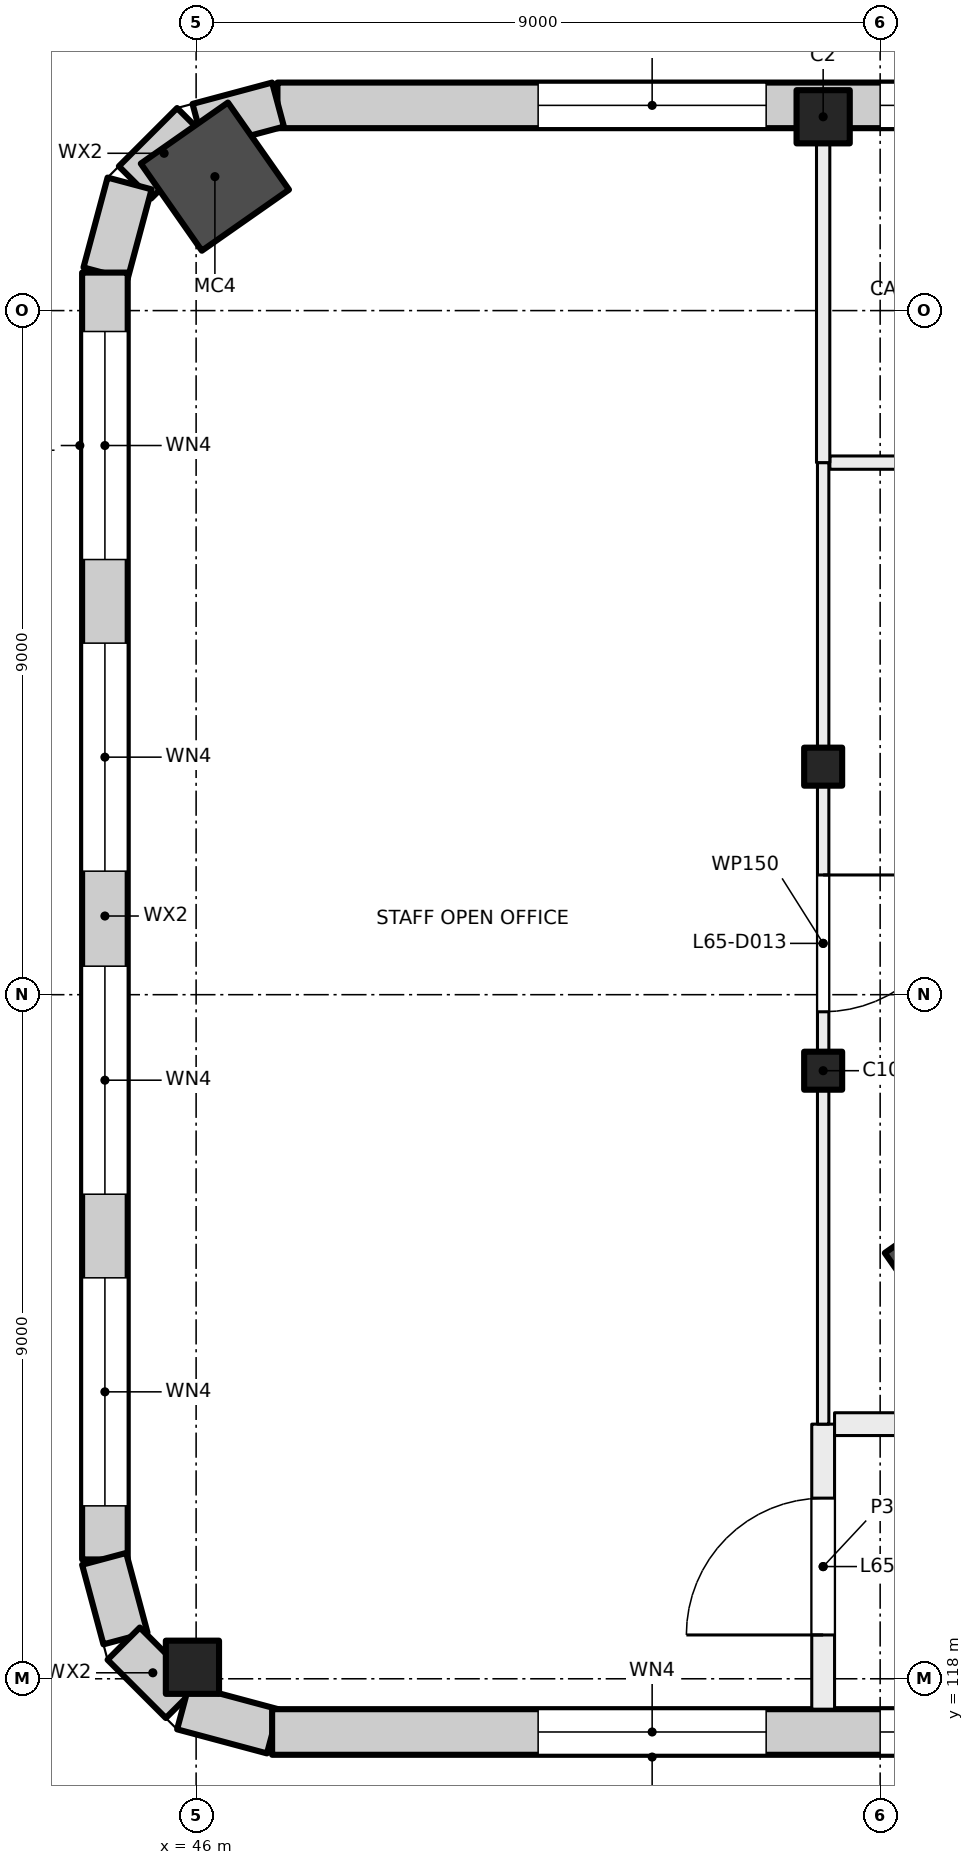
"""IFC4 building model, lengths in metres.
Left out: names, types, materials, properties, quantities, classifications, styles, units other than length and angle.
Written with IfcOpenShell. Run it as: python <this file> out.ifc"""

import sys

from ifc_helpers import new_model, si_unit, direction, frame, frame_2d, origin, origin_2d, place, context, subcontext, project, spatial, rectangle, hollow_rectangle, extrude, element, fill, save


model = new_model("IFC4")
c1 = context("Model", 3, precision=1e-05, world=origin(), true_north=direction((0.0, 1.0)))
c2 = subcontext(c1, "Body", "Model", "MODEL_VIEW")
j1 = project(units=[si_unit("LENGTHUNIT", "METRE"), si_unit("PLANEANGLEUNIT", "RADIAN")], contexts=[c1])
p1 = place(None, origin())
s1 = spatial("IfcSite", under=j1, at=p1, CompositionType="ELEMENT")
p2 = place(p1, origin())
s2 = spatial("IfcBuilding", under=s1, at=p2, CompositionType="ELEMENT")
p3 = place(p2, frame((0.0, 0.0, 273.5)))
s3 = spatial("IfcBuildingStorey", under=s2, at=p3, CompositionType="ELEMENT", Elevation=273.5)
for number, where, z_axis, x_axis in (
    (1, (46.247, 137.762, 0.0), (0.0, 0.0, 1.0), (0.574, -0.819, 0.0)),
    (2, (56.036, 123.43, 0.0), (0.0, 0.0, 1.0), (0.574, -0.819, 0.0)),
):
    element("IfcColumn", number, at=place(p3, frame(where, z_axis=z_axis, x_axis=x_axis)), inside=s3, PredefinedType="COLUMN", context=c2, shape_type="SweptSolid", body=[
        extrude(hollow_rectangle(XDim=1.4, YDim=1.4, WallThickness=0.025, at=origin_2d()), origin(), (0.0, 0.0, 1.0), 4.0),
    ])
for number, where, z_axis, x_axis in (
    (3, (54.25, 130.0, 0.0), (0.0, 0.0, 1.0), (1.0, 0.0, 0.0)),
    (4, (54.25, 126.0, 0.0), (0.0, 0.0, 1.0), (1.0, 0.0, 0.0)),
):
    element("IfcColumn", number, at=place(p3, frame(where, z_axis=z_axis, x_axis=x_axis)), inside=s3, PredefinedType="COLUMN", context=c2, shape_type="SweptSolid", body=[
        extrude(rectangle(XDim=0.5, YDim=0.5, at=origin_2d()), origin(), (0.0, 0.0, 1.0), 4.0),
    ])
for number, where, z_axis, x_axis in (
    (5, (54.25, 138.55, 0.0), (0.0, 0.0, 1.0), (1.0, 0.0, 0.0)),
    (6, (45.952, 118.152, 0.0), (0.0, 0.0, 1.0), (1.0, 0.0, 0.0)),
):
    element("IfcColumn", number, at=place(p3, frame(where, z_axis=z_axis, x_axis=x_axis)), inside=s3, PredefinedType="COLUMN", context=c2, shape_type="SweptSolid", body=[
        extrude(rectangle(XDim=0.7, YDim=0.7, at=origin_2d()), origin(), (0.0, 0.0, 1.0), 4.0),
    ])
p4 = place(p3, frame((47.07, 138.7, 0.0), z_axis=(0.0, 0.0, 1.0), x_axis=(1.0, 0.0, 0.0)))
e7 = element("IfcWall", 7, at=p4, inside=s3, PredefinedType="SOLIDWALL", context=c2, shape_type="SweptSolid", body=[
    extrude(rectangle(XDim=43.91, YDim=0.6, at=frame_2d((21.955, 0.0))), origin(), (0.0, 0.0, 1.0), 3.625),
])
p5 = place(p4, frame((3.43, 0.0, 0.9)))
e8 = element("IfcOpeningElement", 8, at=p5, cuts=e7, PredefinedType="OPENING", context=c2, shape_type="SweptSolid", body=[
    extrude(rectangle(XDim=3.0, YDim=2.4, at=frame_2d((1.5, 1.2))), frame((0.0, 0.31, 0.0), z_axis=(0.0, -1.0, 0.0), x_axis=(1.0, 0.0, 0.0)), (0.0, 0.0, 1.0), 0.62),
])
p6 = place(p4, frame((7.93, 0.0, 0.9)))
e9 = element("IfcOpeningElement", 9, at=p6, cuts=e7, PredefinedType="OPENING", context=c2, shape_type="SweptSolid", body=[
    extrude(rectangle(XDim=3.0, YDim=2.4, at=frame_2d((1.5, 1.2))), frame((0.0, 0.31, 0.0), z_axis=(0.0, -1.0, 0.0), x_axis=(1.0, 0.0, 0.0)), (0.0, 0.0, 1.0), 0.62),
])
p7 = place(p4, frame((12.43, 0.0, 0.9)))
e10 = element("IfcOpeningElement", 10, at=p7, cuts=e7, PredefinedType="OPENING", context=c2, shape_type="SweptSolid", body=[
    extrude(rectangle(XDim=3.0, YDim=2.4, at=frame_2d((1.5, 1.2))), frame((0.0, 0.31, 0.0), z_axis=(0.0, -1.0, 0.0), x_axis=(1.0, 0.0, 0.0)), (0.0, 0.0, 1.0), 0.62),
])
p8 = place(p4, frame((16.93, 0.0, 0.9)))
e11 = element("IfcOpeningElement", 11, at=p8, cuts=e7, PredefinedType="OPENING", context=c2, shape_type="SweptSolid", body=[
    extrude(rectangle(XDim=3.0, YDim=2.4, at=frame_2d((1.5, 1.2))), frame((0.0, 0.31, 0.0), z_axis=(0.0, -1.0, 0.0), x_axis=(1.0, 0.0, 0.0)), (0.0, 0.0, 1.0), 0.62),
])
p9 = place(p4, frame((21.43, 0.0, 0.9)))
e12 = element("IfcOpeningElement", 12, at=p9, cuts=e7, PredefinedType="OPENING", context=c2, shape_type="SweptSolid", body=[
    extrude(rectangle(XDim=3.0, YDim=2.4, at=frame_2d((1.5, 1.2))), frame((0.0, 0.31, 0.0), z_axis=(0.0, -1.0, 0.0), x_axis=(1.0, 0.0, 0.0)), (0.0, 0.0, 1.0), 0.62),
])
p10 = place(p4, frame((25.93, 0.0, 0.9)))
e13 = element("IfcOpeningElement", 13, at=p10, cuts=e7, PredefinedType="OPENING", context=c2, shape_type="SweptSolid", body=[
    extrude(rectangle(XDim=3.0, YDim=2.4, at=frame_2d((1.5, 1.2))), frame((0.0, 0.31, 0.0), z_axis=(0.0, -1.0, 0.0), x_axis=(1.0, 0.0, 0.0)), (0.0, 0.0, 1.0), 0.62),
])
p11 = place(p4, frame((30.43, 0.0, 0.9)))
e14 = element("IfcOpeningElement", 14, at=p11, cuts=e7, PredefinedType="OPENING", context=c2, shape_type="SweptSolid", body=[
    extrude(rectangle(XDim=3.0, YDim=2.4, at=frame_2d((1.5, 1.2))), frame((0.0, 0.31, 0.0), z_axis=(0.0, -1.0, 0.0), x_axis=(1.0, 0.0, 0.0)), (0.0, 0.0, 1.0), 0.62),
])
p12 = place(p4, frame((34.93, 0.0, 0.9)))
e15 = element("IfcOpeningElement", 15, at=p12, cuts=e7, PredefinedType="OPENING", context=c2, shape_type="SweptSolid", body=[
    extrude(rectangle(XDim=3.0, YDim=2.4, at=frame_2d((1.5, 1.2))), frame((0.0, 0.31, 0.0), z_axis=(0.0, -1.0, 0.0), x_axis=(1.0, 0.0, 0.0)), (0.0, 0.0, 1.0), 0.62),
])
p13 = place(p4, frame((39.43, 0.0, 0.9)))
e16 = element("IfcOpeningElement", 16, at=p13, cuts=e7, PredefinedType="OPENING", context=c2, shape_type="SweptSolid", body=[
    extrude(rectangle(XDim=3.0, YDim=2.4, at=frame_2d((1.5, 1.2))), frame((0.0, 0.31, 0.0), z_axis=(0.0, -1.0, 0.0), x_axis=(1.0, 0.0, 0.0)), (0.0, 0.0, 1.0), 0.62),
])
p14 = place(p3, frame((46.031, 138.43, 0.0), z_axis=(0.0, 0.0, 1.0), x_axis=(0.965939004864, 0.25876985698, 0.0)))
e17 = element("IfcWall", 17, at=p14, inside=s3, PredefinedType="SOLIDWALL", context=c2, shape_type="SweptSolid", body=[
    extrude(rectangle(XDim=1.084, YDim=0.6, at=frame_2d((0.542, 0.0))), origin(), (0.0, 0.0, 1.0), 3.625),
])
p15 = place(p3, frame((45.196, 137.686, 0.0), z_axis=(0.0, 0.0, 1.0), x_axis=(0.707106781187, 0.707106781187, 0.0)))
e18 = element("IfcWall", 18, at=p15, inside=s3, PredefinedType="SOLIDWALL", context=c2, shape_type="SweptSolid", body=[
    extrude(rectangle(XDim=1.084, YDim=0.6, at=frame_2d((0.542, 0.0))), origin(), (0.0, 0.0, 1.0), 3.625),
])
p16 = place(p3, frame((44.808, 136.49, 0.0), z_axis=(0.0, 0.0, 1.0), x_axis=(0.258878975098, 0.965909766102, 0.0)))
e19 = element("IfcWall", 19, at=p16, inside=s3, PredefinedType="SOLIDWALL", context=c2, shape_type="SweptSolid", body=[
    extrude(rectangle(XDim=1.224, YDim=0.6, at=frame_2d((0.612, 0.0))), origin(), (0.0, 0.0, 1.0), 3.625),
])
p17 = place(p3, frame((44.8, 119.57, 0.0), z_axis=(0.0, 0.0, 1.0), x_axis=(0.0, 1.0, 0.0)))
e20 = element("IfcWall", 20, at=p17, inside=s3, PredefinedType="SOLIDWALL", context=c2, shape_type="SweptSolid", body=[
    extrude(rectangle(XDim=16.93, YDim=0.6, at=frame_2d((8.465, 0.0))), origin(), (0.0, 0.0, 1.0), 3.625),
])
p18 = place(p17, frame((0.705, 0.0, 0.9)))
e21 = element("IfcOpeningElement", 21, at=p18, cuts=e20, PredefinedType="OPENING", context=c2, shape_type="SweptSolid", body=[
    extrude(rectangle(XDim=3.0, YDim=2.4, at=frame_2d((1.5, 1.2))), frame((0.0, 0.31, 0.0), z_axis=(0.0, -1.0, 0.0), x_axis=(1.0, 0.0, 0.0)), (0.0, 0.0, 1.0), 0.62),
])
p19 = place(p17, frame((4.805, 0.0, 0.9)))
e22 = element("IfcOpeningElement", 22, at=p19, cuts=e20, PredefinedType="OPENING", context=c2, shape_type="SweptSolid", body=[
    extrude(rectangle(XDim=3.0, YDim=2.4, at=frame_2d((1.5, 1.2))), frame((0.0, 0.31, 0.0), z_axis=(0.0, -1.0, 0.0), x_axis=(1.0, 0.0, 0.0)), (0.0, 0.0, 1.0), 0.62),
])
p20 = place(p17, frame((9.055, 0.0, 0.9)))
e23 = element("IfcOpeningElement", 23, at=p20, cuts=e20, PredefinedType="OPENING", context=c2, shape_type="SweptSolid", body=[
    extrude(rectangle(XDim=3.0, YDim=2.4, at=frame_2d((1.5, 1.2))), frame((0.0, 0.31, 0.0), z_axis=(0.0, -1.0, 0.0), x_axis=(1.0, 0.0, 0.0)), (0.0, 0.0, 1.0), 0.62),
])
p21 = place(p17, frame((13.155, 0.0, 0.9)))
e24 = element("IfcOpeningElement", 24, at=p21, cuts=e20, PredefinedType="OPENING", context=c2, shape_type="SweptSolid", body=[
    extrude(rectangle(XDim=3.0, YDim=2.4, at=frame_2d((1.5, 1.2))), frame((0.0, 0.31, 0.0), z_axis=(0.0, -1.0, 0.0), x_axis=(1.0, 0.0, 0.0)), (0.0, 0.0, 1.0), 0.62),
])
p22 = place(p3, frame((45.07, 118.531, 0.0), z_axis=(0.0, 0.0, 1.0), x_axis=(-0.25876985698, 0.965939004864, 0.0)))
e25 = element("IfcWall", 25, at=p22, inside=s3, PredefinedType="SOLIDWALL", context=c2, shape_type="SweptSolid", body=[
    extrude(rectangle(XDim=1.084, YDim=0.6, at=frame_2d((0.542, 0.0))), origin(), (0.0, 0.0, 1.0), 3.625),
])
p23 = place(p3, frame((45.814, 117.696, 0.0), z_axis=(0.0, 0.0, 1.0), x_axis=(-0.707106781187, 0.707106781187, 0.0)))
e26 = element("IfcWall", 26, at=p23, inside=s3, PredefinedType="SOLIDWALL", context=c2, shape_type="SweptSolid", body=[
    extrude(rectangle(XDim=1.084, YDim=0.6, at=frame_2d((0.542, 0.0))), origin(), (0.0, 0.0, 1.0), 3.625),
])
p24 = place(p3, frame((47.01, 117.308, 0.0), z_axis=(0.0, 0.0, 1.0), x_axis=(-0.965909766102, 0.258878975098, 0.0)))
e27 = element("IfcWall", 27, at=p24, inside=s3, PredefinedType="SOLIDWALL", context=c2, shape_type="SweptSolid", body=[
    extrude(rectangle(XDim=1.224, YDim=0.6, at=frame_2d((0.612, 0.0))), origin(), (0.0, 0.0, 1.0), 3.625),
])
p25 = place(p3, frame((90.98, 117.3, 0.0), z_axis=(0.0, 0.0, 1.0), x_axis=(-1.0, 0.0, 0.0)))
e28 = element("IfcWall", 28, at=p25, inside=s3, PredefinedType="SOLIDWALL", context=c2, shape_type="SweptSolid", body=[
    extrude(rectangle(XDim=43.98, YDim=0.6, at=frame_2d((21.99, 0.0))), origin(), (0.0, 0.0, 1.0), 3.625),
])
p26 = place(p25, frame((1.48, 0.0, 0.9)))
e29 = element("IfcOpeningElement", 29, at=p26, cuts=e28, PredefinedType="OPENING", context=c2, shape_type="SweptSolid", body=[
    extrude(rectangle(XDim=3.0, YDim=2.4, at=frame_2d((1.5, 1.2))), frame((0.0, 0.31, 0.0), z_axis=(0.0, -1.0, 0.0), x_axis=(1.0, 0.0, 0.0)), (0.0, 0.0, 1.0), 0.62),
])
p27 = place(p25, frame((5.98, 0.0, 0.9)))
e30 = element("IfcOpeningElement", 30, at=p27, cuts=e28, PredefinedType="OPENING", context=c2, shape_type="SweptSolid", body=[
    extrude(rectangle(XDim=3.0, YDim=2.4, at=frame_2d((1.5, 1.2))), frame((0.0, 0.31, 0.0), z_axis=(0.0, -1.0, 0.0), x_axis=(1.0, 0.0, 0.0)), (0.0, 0.0, 1.0), 0.62),
])
p28 = place(p25, frame((10.48, 0.0, 0.9)))
e31 = element("IfcOpeningElement", 31, at=p28, cuts=e28, PredefinedType="OPENING", context=c2, shape_type="SweptSolid", body=[
    extrude(rectangle(XDim=3.0, YDim=2.4, at=frame_2d((1.5, 1.2))), frame((0.0, 0.31, 0.0), z_axis=(0.0, -1.0, 0.0), x_axis=(1.0, 0.0, 0.0)), (0.0, 0.0, 1.0), 0.62),
])
p29 = place(p25, frame((14.98, 0.0, 0.9)))
e32 = element("IfcOpeningElement", 32, at=p29, cuts=e28, PredefinedType="OPENING", context=c2, shape_type="SweptSolid", body=[
    extrude(rectangle(XDim=3.0, YDim=2.4, at=frame_2d((1.5, 1.2))), frame((0.0, 0.31, 0.0), z_axis=(0.0, -1.0, 0.0), x_axis=(1.0, 0.0, 0.0)), (0.0, 0.0, 1.0), 0.62),
])
p30 = place(p25, frame((19.48, 0.0, 0.9)))
e33 = element("IfcOpeningElement", 33, at=p30, cuts=e28, PredefinedType="OPENING", context=c2, shape_type="SweptSolid", body=[
    extrude(rectangle(XDim=3.0, YDim=2.4, at=frame_2d((1.5, 1.2))), frame((0.0, 0.31, 0.0), z_axis=(0.0, -1.0, 0.0), x_axis=(1.0, 0.0, 0.0)), (0.0, 0.0, 1.0), 0.62),
])
p31 = place(p25, frame((23.98, 0.0, 0.9)))
e34 = element("IfcOpeningElement", 34, at=p31, cuts=e28, PredefinedType="OPENING", context=c2, shape_type="SweptSolid", body=[
    extrude(rectangle(XDim=3.0, YDim=2.4, at=frame_2d((1.5, 1.2))), frame((0.0, 0.31, 0.0), z_axis=(0.0, -1.0, 0.0), x_axis=(1.0, 0.0, 0.0)), (0.0, 0.0, 1.0), 0.62),
])
p32 = place(p25, frame((28.48, 0.0, 0.9)))
e35 = element("IfcOpeningElement", 35, at=p32, cuts=e28, PredefinedType="OPENING", context=c2, shape_type="SweptSolid", body=[
    extrude(rectangle(XDim=3.0, YDim=2.4, at=frame_2d((1.5, 1.2))), frame((0.0, 0.31, 0.0), z_axis=(0.0, -1.0, 0.0), x_axis=(1.0, 0.0, 0.0)), (0.0, 0.0, 1.0), 0.62),
])
p33 = place(p25, frame((32.98, 0.0, 0.9)))
e36 = element("IfcOpeningElement", 36, at=p33, cuts=e28, PredefinedType="OPENING", context=c2, shape_type="SweptSolid", body=[
    extrude(rectangle(XDim=3.0, YDim=2.4, at=frame_2d((1.5, 1.2))), frame((0.0, 0.31, 0.0), z_axis=(0.0, -1.0, 0.0), x_axis=(1.0, 0.0, 0.0)), (0.0, 0.0, 1.0), 0.62),
])
p34 = place(p25, frame((37.48, 0.0, 0.9)))
e37 = element("IfcOpeningElement", 37, at=p34, cuts=e28, PredefinedType="OPENING", context=c2, shape_type="SweptSolid", body=[
    extrude(rectangle(XDim=3.0, YDim=2.4, at=frame_2d((1.5, 1.2))), frame((0.0, 0.31, 0.0), z_axis=(0.0, -1.0, 0.0), x_axis=(1.0, 0.0, 0.0)), (0.0, 0.0, 1.0), 0.62),
])
p35 = place(p3, frame((54.25, 117.6, 0.0), z_axis=(0.0, 0.0, 1.0), x_axis=(0.0, 1.0, 0.0)))
e38 = element("IfcWall", 38, at=p35, inside=s3, PredefinedType="PARTITIONING", context=c2, shape_type="SweptSolid", body=[
    extrude(rectangle(XDim=3.75, YDim=0.3, at=frame_2d((1.875, 0.0))), origin(), (0.0, 0.0, 1.0), 3.625),
])
p36 = place(p35, frame((0.977, 0.0, 0.0)))
e39 = element("IfcOpeningElement", 39, at=p36, cuts=e38, PredefinedType="OPENING", context=c2, shape_type="SweptSolid", body=[
    extrude(rectangle(XDim=1.8, YDim=2.1, at=frame_2d((0.9, 1.05))), frame((0.0, 0.16, 0.0), z_axis=(0.0, -1.0, 0.0), x_axis=(1.0, 0.0, 0.0)), (0.0, 0.0, 1.0), 0.32),
])
p37 = place(p3, frame((54.4, 121.35, 0.0), z_axis=(0.0, 0.0, 1.0), x_axis=(1.0, 0.0, 0.0)))
e40 = element("IfcWall", 40, at=p37, inside=s3, PredefinedType="PARTITIONING", context=c2, shape_type="SweptSolid", body=[
    extrude(rectangle(XDim=31.425, YDim=0.3, at=frame_2d((15.712, 0.0))), origin(), (0.0, 0.0, 1.0), 3.625),
])
p38 = place(p37, frame((17.35, 0.0, 0.0)))
e41 = element("IfcOpeningElement", 41, at=p38, cuts=e40, PredefinedType="OPENING", context=c2, shape_type="SweptSolid", body=[
    extrude(rectangle(XDim=1.0, YDim=2.1, at=frame_2d((0.5, 1.05))), frame((0.0, 0.16, 0.0), z_axis=(0.0, -1.0, 0.0), x_axis=(1.0, 0.0, 0.0)), (0.0, 0.0, 1.0), 0.32),
])
p39 = place(p37, frame((25.95, 0.0, 0.0)))
e42 = element("IfcOpeningElement", 42, at=p39, cuts=e40, PredefinedType="OPENING", context=c2, shape_type="SweptSolid", body=[
    extrude(rectangle(XDim=1.8, YDim=2.1, at=frame_2d((0.9, 1.05))), frame((0.0, 0.16, 0.0), z_axis=(0.0, -1.0, 0.0), x_axis=(1.0, 0.0, 0.0)), (0.0, 0.0, 1.0), 0.32),
])
p40 = place(p37, frame((8.25, 0.0, 0.0)))
e43 = element("IfcOpeningElement", 43, at=p40, cuts=e40, PredefinedType="OPENING", context=c2, shape_type="SweptSolid", body=[
    extrude(rectangle(XDim=1.2, YDim=2.1, at=frame_2d((0.6, 1.05))), frame((0.0, 0.16, 0.0), z_axis=(0.0, -1.0, 0.0), x_axis=(1.0, 0.0, 0.0)), (0.0, 0.0, 1.0), 0.32),
])
p41 = place(p3, frame((54.25, 134.0, 0.0), z_axis=(0.0, 0.0, 1.0), x_axis=(0.0, -1.0, 0.0)))
e44 = element("IfcWall", 44, at=p41, inside=s3, PredefinedType="PARTITIONING", context=c2, shape_type="SweptSolid", body=[
    extrude(rectangle(XDim=12.65, YDim=0.15, at=frame_2d((6.325, 0.0))), origin(), (0.0, 0.0, 1.0), 3.625),
])
p42 = place(p41, frame((5.425, 0.0, 0.0)))
e45 = element("IfcOpeningElement", 45, at=p42, cuts=e44, PredefinedType="OPENING", context=c2, shape_type="SweptSolid", body=[
    extrude(rectangle(XDim=1.8, YDim=2.1, at=frame_2d((0.9, 1.05))), frame((0.0, 0.085, 0.0), z_axis=(0.0, -1.0, 0.0), x_axis=(1.0, 0.0, 0.0)), (0.0, 0.0, 1.0), 0.17),
])
p43 = place(p3, frame((63.162, 134.0, 0.0), z_axis=(0.0, 0.0, 1.0), x_axis=(-1.0, 0.0, 0.0)))
e46 = element("IfcWall", 46, at=p43, inside=s3, PredefinedType="PARTITIONING", context=c2, shape_type="SweptSolid", body=[
    extrude(rectangle(XDim=8.824, YDim=0.175, at=frame_2d((4.412, 0.0))), origin(), (0.0, 0.0, 1.0), 3.625),
])
p44 = place(p43, frame((3.812, 0.0, 0.0)))
e47 = element("IfcOpeningElement", 47, at=p44, cuts=e46, PredefinedType="OPENING", context=c2, shape_type="SweptSolid", body=[
    extrude(rectangle(XDim=1.2, YDim=2.1, at=frame_2d((0.6, 1.05))), frame((0.0, 0.097, 0.0), z_axis=(0.0, -1.0, 0.0), x_axis=(1.0, 0.0, 0.0)), (0.0, 0.0, 1.0), 0.195),
])
p45 = place(p3, frame((54.25, 138.4, 0.0), z_axis=(0.0, 0.0, 1.0), x_axis=(0.0, -1.0, 0.0)))
e48 = element("IfcWall", 48, at=p45, inside=s3, PredefinedType="PARTITIONING", context=c2, shape_type="SweptSolid", body=[
    extrude(rectangle(XDim=4.4, YDim=0.175, at=frame_2d((2.2, 0.0))), origin(), (0.0, 0.0, 1.0), 3.625),
])
p46 = place(p5, origin())
e49 = element("IfcWindow", 49, at=p46, inside=s3, PartitioningType="SINGLE_PANEL", PredefinedType="WINDOW", context=c2, shape_type="SweptSolid", body=[
    extrude(rectangle(XDim=3.0, YDim=2.4, at=frame_2d((1.5, 1.2))), frame((0.0, 0.03, 0.0), z_axis=(0.0, -1.0, 0.0), x_axis=(1.0, 0.0, 0.0)), (0.0, 0.0, 1.0), 0.06),
])
fill(e8, e49)
p47 = place(p6, origin())
e50 = element("IfcWindow", 50, at=p47, inside=s3, PartitioningType="SINGLE_PANEL", PredefinedType="WINDOW", context=c2, shape_type="SweptSolid", body=[
    extrude(rectangle(XDim=3.0, YDim=2.4, at=frame_2d((1.5, 1.2))), frame((0.0, 0.03, 0.0), z_axis=(0.0, -1.0, 0.0), x_axis=(1.0, 0.0, 0.0)), (0.0, 0.0, 1.0), 0.06),
])
fill(e9, e50)
p48 = place(p18, origin())
e51 = element("IfcWindow", 51, at=p48, inside=s3, PartitioningType="SINGLE_PANEL", PredefinedType="WINDOW", context=c2, shape_type="SweptSolid", body=[
    extrude(rectangle(XDim=3.0, YDim=2.4, at=frame_2d((1.5, 1.2))), frame((0.0, 0.03, 0.0), z_axis=(0.0, -1.0, 0.0), x_axis=(1.0, 0.0, 0.0)), (0.0, 0.0, 1.0), 0.06),
])
fill(e21, e51)
p49 = place(p19, origin())
e52 = element("IfcWindow", 52, at=p49, inside=s3, PartitioningType="SINGLE_PANEL", PredefinedType="WINDOW", context=c2, shape_type="SweptSolid", body=[
    extrude(rectangle(XDim=3.0, YDim=2.4, at=frame_2d((1.5, 1.2))), frame((0.0, 0.03, 0.0), z_axis=(0.0, -1.0, 0.0), x_axis=(1.0, 0.0, 0.0)), (0.0, 0.0, 1.0), 0.06),
])
fill(e22, e52)
p50 = place(p20, origin())
e53 = element("IfcWindow", 53, at=p50, inside=s3, PartitioningType="SINGLE_PANEL", PredefinedType="WINDOW", context=c2, shape_type="SweptSolid", body=[
    extrude(rectangle(XDim=3.0, YDim=2.4, at=frame_2d((1.5, 1.2))), frame((0.0, 0.03, 0.0), z_axis=(0.0, -1.0, 0.0), x_axis=(1.0, 0.0, 0.0)), (0.0, 0.0, 1.0), 0.06),
])
fill(e23, e53)
p51 = place(p21, origin())
e54 = element("IfcWindow", 54, at=p51, inside=s3, PartitioningType="SINGLE_PANEL", PredefinedType="WINDOW", context=c2, shape_type="SweptSolid", body=[
    extrude(rectangle(XDim=3.0, YDim=2.4, at=frame_2d((1.5, 1.2))), frame((0.0, 0.03, 0.0), z_axis=(0.0, -1.0, 0.0), x_axis=(1.0, 0.0, 0.0)), (0.0, 0.0, 1.0), 0.06),
])
fill(e24, e54)
p52 = place(p33, origin())
e55 = element("IfcWindow", 55, at=p52, inside=s3, PartitioningType="SINGLE_PANEL", PredefinedType="WINDOW", context=c2, shape_type="SweptSolid", body=[
    extrude(rectangle(XDim=3.0, YDim=2.4, at=frame_2d((1.5, 1.2))), frame((0.0, 0.03, 0.0), z_axis=(0.0, -1.0, 0.0), x_axis=(1.0, 0.0, 0.0)), (0.0, 0.0, 1.0), 0.06),
])
fill(e36, e55)
p53 = place(p34, origin())
e56 = element("IfcWindow", 56, at=p53, inside=s3, PartitioningType="SINGLE_PANEL", PredefinedType="WINDOW", context=c2, shape_type="SweptSolid", body=[
    extrude(rectangle(XDim=3.0, YDim=2.4, at=frame_2d((1.5, 1.2))), frame((0.0, 0.03, 0.0), z_axis=(0.0, -1.0, 0.0), x_axis=(1.0, 0.0, 0.0)), (0.0, 0.0, 1.0), 0.06),
])
fill(e37, e56)
p54 = place(p36, origin())
e57 = element("IfcDoor", 57, at=p54, inside=s3, OperationType="DOUBLE_DOOR_SINGLE_SWING", PredefinedType="DOOR", context=c2, shape_type="SweptSolid", body=[
    extrude(rectangle(XDim=1.8, YDim=2.1, at=frame_2d((0.9, 1.05))), frame((0.0, 0.025, 0.0), z_axis=(0.0, -1.0, 0.0), x_axis=(1.0, 0.0, 0.0)), (0.0, 0.0, 1.0), 0.05),
])
fill(e39, e57)
p55 = place(p42, origin())
e58 = element("IfcDoor", 58, at=p55, inside=s3, OperationType="DOUBLE_DOOR_SINGLE_SWING", PredefinedType="DOOR", context=c2, shape_type="SweptSolid", body=[
    extrude(rectangle(XDim=1.8, YDim=2.1, at=frame_2d((0.9, 1.05))), frame((0.0, 0.025, 0.0), z_axis=(0.0, -1.0, 0.0), x_axis=(1.0, 0.0, 0.0)), (0.0, 0.0, 1.0), 0.05),
])
fill(e45, e58)
save(model, sys.argv[1])
